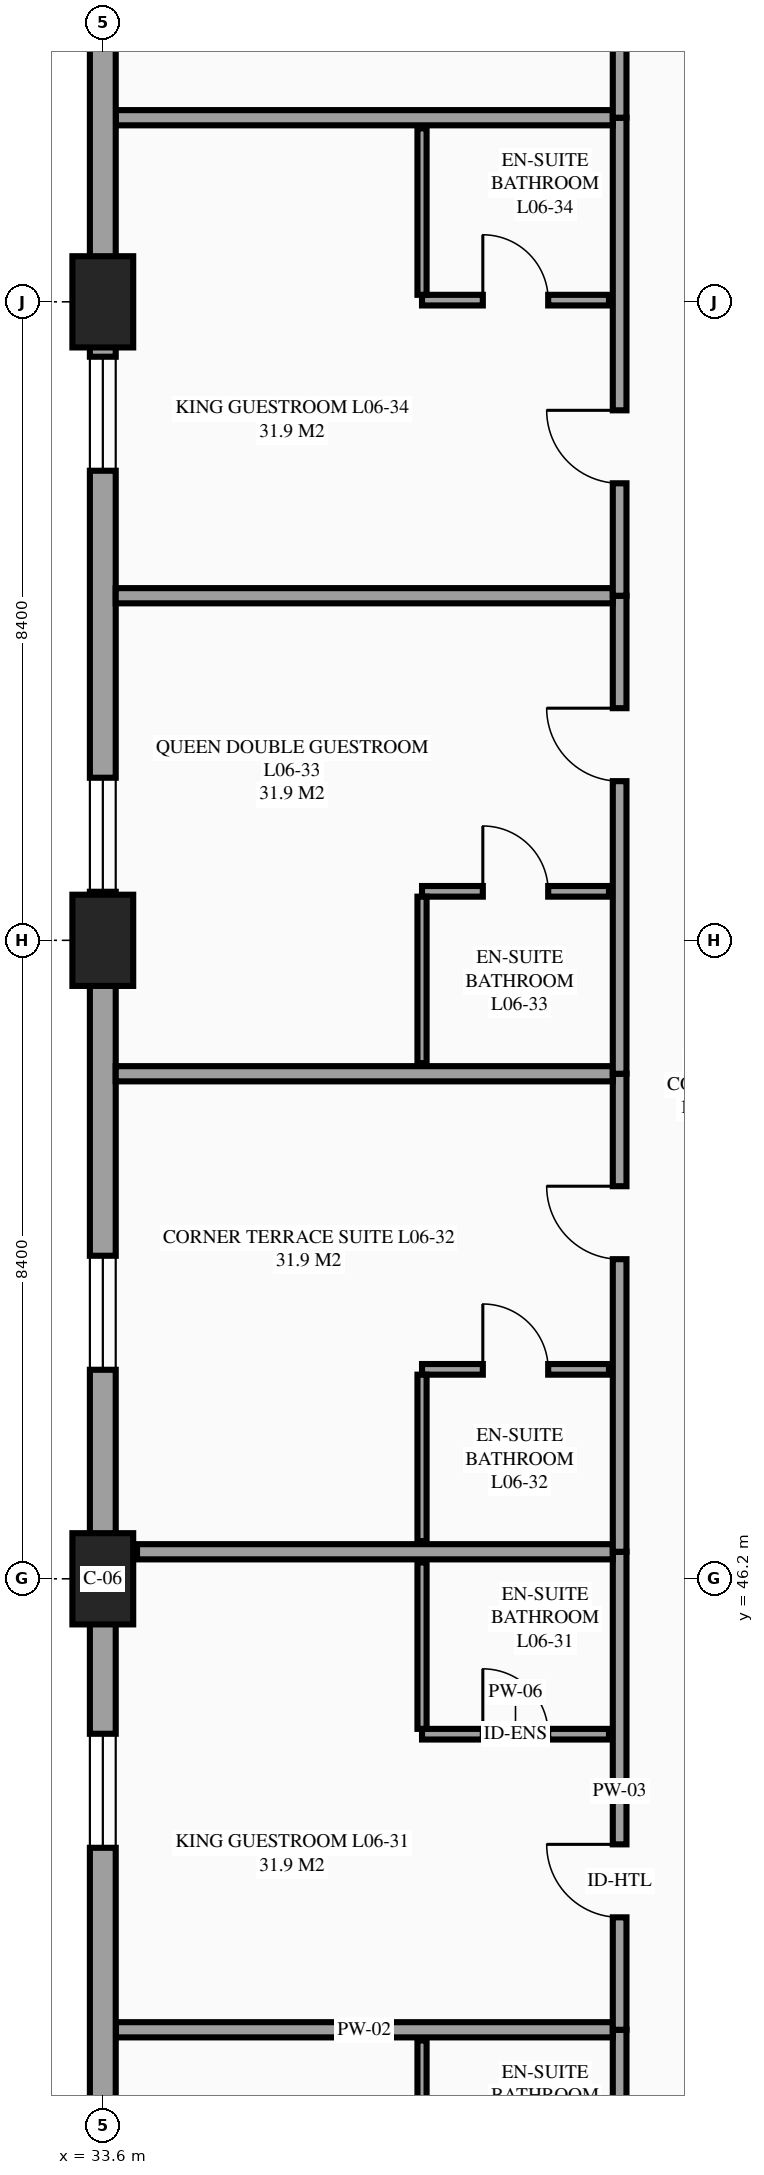
"""IFC4 building model, lengths in metres.
Left out: names, types, materials, properties, quantities, classifications, styles, units other than length and angle.
Written with IfcOpenShell. Run it as: python <this file> out.ifc"""

import sys

from ifc_helpers import new_model, si_unit, direction, frame, frame_2d, origin, origin_2d, place, context, subcontext, project, spatial, rectangle, extrude, element, fill, save


model = new_model("IFC4")
c1 = context("Model", 3, precision=1e-05, world=origin(), true_north=direction((0.0, 1.0)))
c2 = subcontext(c1, "Body", "Model", "MODEL_VIEW")
j1 = project(units=[si_unit("LENGTHUNIT", "METRE"), si_unit("PLANEANGLEUNIT", "RADIAN")], contexts=[c1])
p1 = place(None, origin())
s1 = spatial("IfcSite", under=j1, at=p1, CompositionType="ELEMENT")
p2 = place(p1, origin())
s2 = spatial("IfcBuilding", under=s1, at=p2, CompositionType="ELEMENT")
p3 = place(p2, frame((0.0, 0.0, 25.5)))
s3 = spatial("IfcBuildingStorey", under=s2, at=p3, CompositionType="ELEMENT", Elevation=25.5)
for number, where, z_axis, x_axis in (
    (1, (33.6, 46.2, 0.0), (0.0, 0.0, 1.0), (1.0, 0.0, 0.0)),
    (2, (33.6, 54.6, 0.0), (0.0, 0.0, 1.0), (1.0, 0.0, 0.0)),
    (3, (33.6, 63.0, 0.0), (0.0, 0.0, 1.0), (1.0, 0.0, 0.0)),
):
    element("IfcColumn", number, at=place(p3, frame(where, z_axis=z_axis, x_axis=x_axis)), inside=s3, PredefinedType="COLUMN", context=c2, shape_type="SweptSolid", body=[
        extrude(rectangle(XDim=0.8, YDim=1.2, at=origin_2d()), origin(), (0.0, 0.0, 1.0), 3.6),
    ])
p4 = place(p3, frame((33.6, 63.0, 0.0), z_axis=(0.0, 0.0, 1.0), x_axis=(0.0, -1.0, 0.0)))
e4 = element("IfcWall", 4, at=p4, inside=s3, PredefinedType="STANDARD", context=c2, shape_type="SweptSolid", body=[
    extrude(rectangle(XDim=16.8, YDim=0.34, at=frame_2d((8.4, 0.0))), origin(), (0.0, 0.0, 1.0), 2.63),
])
p5 = place(p4, frame((12.55, 0.0, 0.85)))
e5 = element("IfcOpeningElement", 5, at=p5, cuts=e4, PredefinedType="OPENING", context=c2, shape_type="SweptSolid", body=[
    extrude(rectangle(XDim=1.5, YDim=1.5, at=frame_2d((0.75, 0.75))), frame((0.0, 0.18, 0.0), z_axis=(0.0, -1.0, 0.0), x_axis=(1.0, 0.0, 0.0)), (0.0, 0.0, 1.0), 0.36),
])
p6 = place(p4, frame((6.261, 0.0, 0.85)))
e6 = element("IfcOpeningElement", 6, at=p6, cuts=e4, PredefinedType="OPENING", context=c2, shape_type="SweptSolid", body=[
    extrude(rectangle(XDim=1.5, YDim=1.5, at=frame_2d((0.75, 0.75))), frame((0.0, 0.18, 0.0), z_axis=(0.0, -1.0, 0.0), x_axis=(1.0, 0.0, 0.0)), (0.0, 0.0, 1.0), 0.36),
])
p7 = place(p4, frame((0.722, 0.0, 0.85)))
e7 = element("IfcOpeningElement", 7, at=p7, cuts=e4, PredefinedType="OPENING", context=c2, shape_type="SweptSolid", body=[
    extrude(rectangle(XDim=1.5, YDim=1.5, at=frame_2d((0.75, 0.75))), frame((0.0, 0.18, 0.0), z_axis=(0.0, -1.0, 0.0), x_axis=(1.0, 0.0, 0.0)), (0.0, 0.0, 1.0), 0.36),
])
p8 = place(p3, frame((40.4, 33.978, 0.0), z_axis=(0.0, 0.0, 1.0), x_axis=(0.0, 1.0, 0.0)))
e8 = element("IfcWall", 8, at=p8, inside=s3, PredefinedType="PARTITIONING", context=c2, shape_type="SweptSolid", body=[
    extrude(rectangle(XDim=6.289, YDim=0.18, at=frame_2d((3.145, 0.0))), origin(), (0.0, 0.0, 1.0), 3.375),
])
p9 = place(p8, frame((1.479, 0.0, 0.0)))
e9 = element("IfcOpeningElement", 9, at=p9, cuts=e8, PredefinedType="OPENING", context=c2, shape_type="SweptSolid", body=[
    extrude(rectangle(XDim=0.96, YDim=2.15, at=frame_2d((0.48, 1.075))), frame((0.0, 0.1, 0.0), z_axis=(0.0, -1.0, 0.0), x_axis=(1.0, 0.0, 0.0)), (0.0, 0.0, 1.0), 0.2),
])
p10 = place(p3, frame((33.77, 40.267, 0.0), z_axis=(0.0, 0.0, 1.0), x_axis=(1.0, 0.0, 0.0)))
e10 = element("IfcWall", 10, at=p10, inside=s3, PredefinedType="PARTITIONING", context=c2, shape_type="SweptSolid", body=[
    extrude(rectangle(XDim=6.54, YDim=0.2, at=frame_2d((3.27, 0.0))), origin(), (0.0, 0.0, 1.0), 3.375),
])
p11 = place(p3, frame((37.8, 37.937, 0.0), z_axis=(0.0, 0.0, 1.0), x_axis=(0.0, 1.0, 0.0)))
e11 = element("IfcWall", 11, at=p11, inside=s3, PredefinedType="PARTITIONING", context=c2, shape_type="SweptSolid", body=[
    extrude(rectangle(XDim=2.19, YDim=0.12, at=frame_2d((1.095, 0.0))), origin(), (0.0, 0.0, 1.0), 3.375),
])
p12 = place(p3, frame((40.4, 40.267, 0.0), z_axis=(0.0, 0.0, 1.0), x_axis=(0.0, 1.0, 0.0)))
e12 = element("IfcWall", 12, at=p12, inside=s3, PredefinedType="PARTITIONING", context=c2, shape_type="SweptSolid", body=[
    extrude(rectangle(XDim=6.289, YDim=0.18, at=frame_2d((3.145, 0.0))), origin(), (0.0, 0.0, 1.0), 3.375),
])
p13 = place(p12, frame((1.479, 0.0, 0.0)))
e13 = element("IfcOpeningElement", 13, at=p13, cuts=e12, PredefinedType="OPENING", context=c2, shape_type="SweptSolid", body=[
    extrude(rectangle(XDim=0.96, YDim=2.15, at=frame_2d((0.48, 1.075))), frame((0.0, 0.1, 0.0), z_axis=(0.0, -1.0, 0.0), x_axis=(1.0, 0.0, 0.0)), (0.0, 0.0, 1.0), 0.2),
])
p14 = place(p3, frame((34.05, 46.556, 0.0), z_axis=(0.0, 0.0, 1.0), x_axis=(1.0, 0.0, 0.0)))
e14 = element("IfcWall", 14, at=p14, inside=s3, PredefinedType="PARTITIONING", context=c2, shape_type="SweptSolid", body=[
    extrude(rectangle(XDim=6.26, YDim=0.2, at=frame_2d((3.13, 0.0))), origin(), (0.0, 0.0, 1.0), 3.375),
])
p15 = place(p3, frame((37.8, 44.156, 0.0), z_axis=(0.0, 0.0, 1.0), x_axis=(1.0, 0.0, 0.0)))
e15 = element("IfcWall", 15, at=p15, inside=s3, PredefinedType="PARTITIONING", context=c2, shape_type="SweptSolid", body=[
    extrude(rectangle(XDim=2.46, YDim=0.14, at=frame_2d((1.23, 0.0))), origin(), (0.0, 0.0, 1.0), 3.375),
])
p16 = place(p15, frame((0.8, 0.0, 0.0)))
e16 = element("IfcOpeningElement", 16, at=p16, cuts=e15, PredefinedType="OPENING", context=c2, shape_type="SweptSolid", body=[
    extrude(rectangle(XDim=0.86, YDim=2.1, at=frame_2d((0.43, 1.05))), frame((0.0, 0.08, 0.0), z_axis=(0.0, -1.0, 0.0), x_axis=(1.0, 0.0, 0.0)), (0.0, 0.0, 1.0), 0.16),
])
p17 = place(p3, frame((37.8, 44.226, 0.0), z_axis=(0.0, 0.0, 1.0), x_axis=(0.0, 1.0, 0.0)))
e17 = element("IfcWall", 17, at=p17, inside=s3, PredefinedType="PARTITIONING", context=c2, shape_type="SweptSolid", body=[
    extrude(rectangle(XDim=2.19, YDim=0.12, at=frame_2d((1.095, 0.0))), origin(), (0.0, 0.0, 1.0), 3.375),
])
p18 = place(p3, frame((40.4, 46.556, 0.0), z_axis=(0.0, 0.0, 1.0), x_axis=(0.0, 1.0, 0.0)))
e18 = element("IfcWall", 18, at=p18, inside=s3, PredefinedType="PARTITIONING", context=c2, shape_type="SweptSolid", body=[
    extrude(rectangle(XDim=6.289, YDim=0.18, at=frame_2d((3.145, 0.0))), origin(), (0.0, 0.0, 1.0), 3.375),
])
p19 = place(p18, frame((3.849, 0.0, 0.0)))
e19 = element("IfcOpeningElement", 19, at=p19, cuts=e18, PredefinedType="OPENING", context=c2, shape_type="SweptSolid", body=[
    extrude(rectangle(XDim=0.96, YDim=2.15, at=frame_2d((0.48, 1.075))), frame((0.0, 0.1, 0.0), z_axis=(0.0, -1.0, 0.0), x_axis=(1.0, 0.0, 0.0)), (0.0, 0.0, 1.0), 0.2),
])
p20 = place(p3, frame((33.77, 52.844, 0.0), z_axis=(0.0, 0.0, 1.0), x_axis=(1.0, 0.0, 0.0)))
e20 = element("IfcWall", 20, at=p20, inside=s3, PredefinedType="PARTITIONING", context=c2, shape_type="SweptSolid", body=[
    extrude(rectangle(XDim=6.54, YDim=0.2, at=frame_2d((3.27, 0.0))), origin(), (0.0, 0.0, 1.0), 3.375),
])
p21 = place(p3, frame((37.8, 48.956, 0.0), z_axis=(0.0, 0.0, 1.0), x_axis=(1.0, 0.0, 0.0)))
e21 = element("IfcWall", 21, at=p21, inside=s3, PredefinedType="PARTITIONING", context=c2, shape_type="SweptSolid", body=[
    extrude(rectangle(XDim=2.46, YDim=0.14, at=frame_2d((1.23, 0.0))), origin(), (0.0, 0.0, 1.0), 3.375),
])
p22 = place(p21, frame((0.8, 0.0, 0.0)))
e22 = element("IfcOpeningElement", 22, at=p22, cuts=e21, PredefinedType="OPENING", context=c2, shape_type="SweptSolid", body=[
    extrude(rectangle(XDim=0.86, YDim=2.1, at=frame_2d((0.43, 1.05))), frame((0.0, 0.08, 0.0), z_axis=(0.0, -1.0, 0.0), x_axis=(1.0, 0.0, 0.0)), (0.0, 0.0, 1.0), 0.16),
])
p23 = place(p3, frame((37.8, 46.696, 0.0), z_axis=(0.0, 0.0, 1.0), x_axis=(0.0, 1.0, 0.0)))
e23 = element("IfcWall", 23, at=p23, inside=s3, PredefinedType="PARTITIONING", context=c2, shape_type="SweptSolid", body=[
    extrude(rectangle(XDim=2.19, YDim=0.12, at=frame_2d((1.095, 0.0))), origin(), (0.0, 0.0, 1.0), 3.375),
])
p24 = place(p3, frame((40.4, 52.844, 0.0), z_axis=(0.0, 0.0, 1.0), x_axis=(0.0, 1.0, 0.0)))
e24 = element("IfcWall", 24, at=p24, inside=s3, PredefinedType="PARTITIONING", context=c2, shape_type="SweptSolid", body=[
    extrude(rectangle(XDim=6.289, YDim=0.18, at=frame_2d((3.145, 0.0))), origin(), (0.0, 0.0, 1.0), 3.375),
])
p25 = place(p24, frame((3.85, 0.0, 0.0)))
e25 = element("IfcOpeningElement", 25, at=p25, cuts=e24, PredefinedType="OPENING", context=c2, shape_type="SweptSolid", body=[
    extrude(rectangle(XDim=0.96, YDim=2.15, at=frame_2d((0.48, 1.075))), frame((0.0, 0.1, 0.0), z_axis=(0.0, -1.0, 0.0), x_axis=(1.0, 0.0, 0.0)), (0.0, 0.0, 1.0), 0.2),
])
p26 = place(p3, frame((33.77, 59.133, 0.0), z_axis=(0.0, 0.0, 1.0), x_axis=(1.0, 0.0, 0.0)))
e26 = element("IfcWall", 26, at=p26, inside=s3, PredefinedType="PARTITIONING", context=c2, shape_type="SweptSolid", body=[
    extrude(rectangle(XDim=6.54, YDim=0.2, at=frame_2d((3.27, 0.0))), origin(), (0.0, 0.0, 1.0), 3.375),
])
p27 = place(p3, frame((37.8, 55.244, 0.0), z_axis=(0.0, 0.0, 1.0), x_axis=(1.0, 0.0, 0.0)))
e27 = element("IfcWall", 27, at=p27, inside=s3, PredefinedType="PARTITIONING", context=c2, shape_type="SweptSolid", body=[
    extrude(rectangle(XDim=2.46, YDim=0.14, at=frame_2d((1.23, 0.0))), origin(), (0.0, 0.0, 1.0), 3.375),
])
p28 = place(p27, frame((0.8, 0.0, 0.0)))
e28 = element("IfcOpeningElement", 28, at=p28, cuts=e27, PredefinedType="OPENING", context=c2, shape_type="SweptSolid", body=[
    extrude(rectangle(XDim=0.86, YDim=2.1, at=frame_2d((0.43, 1.05))), frame((0.0, 0.08, 0.0), z_axis=(0.0, -1.0, 0.0), x_axis=(1.0, 0.0, 0.0)), (0.0, 0.0, 1.0), 0.16),
])
p29 = place(p3, frame((37.8, 52.984, 0.0), z_axis=(0.0, 0.0, 1.0), x_axis=(0.0, 1.0, 0.0)))
e29 = element("IfcWall", 29, at=p29, inside=s3, PredefinedType="PARTITIONING", context=c2, shape_type="SweptSolid", body=[
    extrude(rectangle(XDim=2.19, YDim=0.12, at=frame_2d((1.095, 0.0))), origin(), (0.0, 0.0, 1.0), 3.375),
])
p30 = place(p3, frame((40.4, 59.133, 0.0), z_axis=(0.0, 0.0, 1.0), x_axis=(0.0, 1.0, 0.0)))
e30 = element("IfcWall", 30, at=p30, inside=s3, PredefinedType="PARTITIONING", context=c2, shape_type="SweptSolid", body=[
    extrude(rectangle(XDim=6.289, YDim=0.18, at=frame_2d((3.145, 0.0))), origin(), (0.0, 0.0, 1.0), 3.375),
])
p31 = place(p30, frame((1.479, 0.0, 0.0)))
e31 = element("IfcOpeningElement", 31, at=p31, cuts=e30, PredefinedType="OPENING", context=c2, shape_type="SweptSolid", body=[
    extrude(rectangle(XDim=0.96, YDim=2.15, at=frame_2d((0.48, 1.075))), frame((0.0, 0.1, 0.0), z_axis=(0.0, -1.0, 0.0), x_axis=(1.0, 0.0, 0.0)), (0.0, 0.0, 1.0), 0.2),
])
p32 = place(p3, frame((33.77, 65.422, 0.0), z_axis=(0.0, 0.0, 1.0), x_axis=(1.0, 0.0, 0.0)))
e32 = element("IfcWall", 32, at=p32, inside=s3, PredefinedType="PARTITIONING", context=c2, shape_type="SweptSolid", body=[
    extrude(rectangle(XDim=6.54, YDim=0.2, at=frame_2d((3.27, 0.0))), origin(), (0.0, 0.0, 1.0), 3.375),
])
p33 = place(p3, frame((37.8, 63.022, 0.0), z_axis=(0.0, 0.0, 1.0), x_axis=(1.0, 0.0, 0.0)))
e33 = element("IfcWall", 33, at=p33, inside=s3, PredefinedType="PARTITIONING", context=c2, shape_type="SweptSolid", body=[
    extrude(rectangle(XDim=2.46, YDim=0.14, at=frame_2d((1.23, 0.0))), origin(), (0.0, 0.0, 1.0), 2.43),
])
p34 = place(p33, frame((0.8, 0.0, 0.0)))
e34 = element("IfcOpeningElement", 34, at=p34, cuts=e33, PredefinedType="OPENING", context=c2, shape_type="SweptSolid", body=[
    extrude(rectangle(XDim=0.86, YDim=2.1, at=frame_2d((0.43, 1.05))), frame((0.0, 0.08, 0.0), z_axis=(0.0, -1.0, 0.0), x_axis=(1.0, 0.0, 0.0)), (0.0, 0.0, 1.0), 0.16),
])
p35 = place(p3, frame((37.8, 63.092, 0.0), z_axis=(0.0, 0.0, 1.0), x_axis=(0.0, 1.0, 0.0)))
e35 = element("IfcWall", 35, at=p35, inside=s3, PredefinedType="PARTITIONING", context=c2, shape_type="SweptSolid", body=[
    extrude(rectangle(XDim=2.19, YDim=0.12, at=frame_2d((1.095, 0.0))), origin(), (0.0, 0.0, 1.0), 3.375),
])
p36 = place(p3, frame((40.4, 65.422, 0.0), z_axis=(0.0, 0.0, 1.0), x_axis=(0.0, 1.0, 0.0)))
e36 = element("IfcWall", 36, at=p36, inside=s3, PredefinedType="PARTITIONING", context=c2, shape_type="SweptSolid", body=[
    extrude(rectangle(XDim=6.289, YDim=0.18, at=frame_2d((3.145, 0.0))), origin(), (0.0, 0.0, 1.0), 3.375),
])
p37 = place(p36, frame((1.479, 0.0, 0.0)))
e37 = element("IfcOpeningElement", 37, at=p37, cuts=e36, PredefinedType="OPENING", context=c2, shape_type="SweptSolid", body=[
    extrude(rectangle(XDim=0.96, YDim=2.15, at=frame_2d((0.48, 1.075))), frame((0.0, 0.1, 0.0), z_axis=(0.0, -1.0, 0.0), x_axis=(1.0, 0.0, 0.0)), (0.0, 0.0, 1.0), 0.2),
])
p38 = place(p3, frame((33.6, 71.4, 0.0), z_axis=(0.0, 0.0, 1.0), x_axis=(0.0, -1.0, 0.0)))
e38 = element("IfcWall", 38, at=p38, inside=s3, PredefinedType="STANDARD", context=c2, shape_type="SweptSolid", body=[
    extrude(rectangle(XDim=8.4, YDim=0.34, at=frame_2d((4.2, 0.0))), origin(), (0.0, 0.0, 1.0), 2.73),
])
p39 = place(p38, frame((2.083, 0.0, 0.85)))
e39 = element("IfcOpeningElement", 39, at=p39, cuts=e38, PredefinedType="OPENING", context=c2, shape_type="SweptSolid", body=[
    extrude(rectangle(XDim=1.5, YDim=1.5, at=frame_2d((0.75, 0.75))), frame((0.0, 0.18, 0.0), z_axis=(0.0, -1.0, 0.0), x_axis=(1.0, 0.0, 0.0)), (0.0, 0.0, 1.0), 0.36),
])
p40 = place(p3, frame((33.6, 46.2, 0.0), z_axis=(0.0, 0.0, 1.0), x_axis=(0.0, -1.0, 0.0)))
e40 = element("IfcWall", 40, at=p40, inside=s3, PredefinedType="STANDARD", context=c2, shape_type="SweptSolid", body=[
    extrude(rectangle(XDim=8.4, YDim=0.34, at=frame_2d((4.2, 0.0))), origin(), (0.0, 0.0, 1.0), 3.126),
])
p41 = place(p40, frame((2.039, 0.0, 0.85)))
e41 = element("IfcOpeningElement", 41, at=p41, cuts=e40, PredefinedType="OPENING", context=c2, shape_type="SweptSolid", body=[
    extrude(rectangle(XDim=1.5, YDim=1.5, at=frame_2d((0.75, 0.75))), frame((0.0, 0.18, 0.0), z_axis=(0.0, -1.0, 0.0), x_axis=(1.0, 0.0, 0.0)), (0.0, 0.0, 1.0), 0.36),
])
p42 = place(p41, origin())
e42 = element("IfcWindow", 42, at=p42, inside=s3, PartitioningType="SINGLE_PANEL", PredefinedType="WINDOW", context=c2, shape_type="SweptSolid", body=[
    extrude(rectangle(XDim=1.5, YDim=1.5, at=frame_2d((0.75, 0.75))), frame((0.0, 0.03, 0.0), z_axis=(0.0, -1.0, 0.0), x_axis=(1.0, 0.0, 0.0)), (0.0, 0.0, 1.0), 0.06),
])
fill(e41, e42)
p43 = place(p5, origin())
e43 = element("IfcWindow", 43, at=p43, inside=s3, PartitioningType="SINGLE_PANEL", PredefinedType="WINDOW", context=c2, shape_type="SweptSolid", body=[
    extrude(rectangle(XDim=1.5, YDim=1.5, at=frame_2d((0.75, 0.75))), frame((0.0, 0.03, 0.0), z_axis=(0.0, -1.0, 0.0), x_axis=(1.0, 0.0, 0.0)), (0.0, 0.0, 1.0), 0.06),
])
fill(e5, e43)
p44 = place(p6, origin())
e44 = element("IfcWindow", 44, at=p44, inside=s3, PartitioningType="SINGLE_PANEL", PredefinedType="WINDOW", context=c2, shape_type="SweptSolid", body=[
    extrude(rectangle(XDim=1.5, YDim=1.5, at=frame_2d((0.75, 0.75))), frame((0.0, 0.03, 0.0), z_axis=(0.0, -1.0, 0.0), x_axis=(1.0, 0.0, 0.0)), (0.0, 0.0, 1.0), 0.06),
])
fill(e6, e44)
p45 = place(p7, origin())
e45 = element("IfcWindow", 45, at=p45, inside=s3, PartitioningType="SINGLE_PANEL", PredefinedType="WINDOW", context=c2, shape_type="SweptSolid", body=[
    extrude(rectangle(XDim=1.5, YDim=1.5, at=frame_2d((0.75, 0.75))), frame((0.0, 0.03, 0.0), z_axis=(0.0, -1.0, 0.0), x_axis=(1.0, 0.0, 0.0)), (0.0, 0.0, 1.0), 0.06),
])
fill(e7, e45)
p46 = place(p13, origin())
e46 = element("IfcDoor", 46, at=p46, inside=s3, OperationType="SINGLE_SWING_RIGHT", PredefinedType="DOOR", context=c2, shape_type="SweptSolid", body=[
    extrude(rectangle(XDim=0.96, YDim=2.15, at=frame_2d((0.48, 1.075))), frame((0.0, 0.025, 0.0), z_axis=(0.0, -1.0, 0.0), x_axis=(1.0, 0.0, 0.0)), (0.0, 0.0, 1.0), 0.05),
])
fill(e13, e46)
p47 = place(p16, origin())
e47 = element("IfcDoor", 47, at=p47, inside=s3, OperationType="SINGLE_SWING_LEFT", PredefinedType="DOOR", context=c2, shape_type="SweptSolid", body=[
    extrude(rectangle(XDim=0.86, YDim=2.1, at=frame_2d((0.43, 1.05))), frame((0.0, 0.025, 0.0), z_axis=(0.0, -1.0, 0.0), x_axis=(1.0, 0.0, 0.0)), (0.0, 0.0, 1.0), 0.05),
])
fill(e16, e47)
p48 = place(p19, origin())
e48 = element("IfcDoor", 48, at=p48, inside=s3, OperationType="SINGLE_SWING_RIGHT", PredefinedType="DOOR", context=c2, shape_type="SweptSolid", body=[
    extrude(rectangle(XDim=0.96, YDim=2.15, at=frame_2d((0.48, 1.075))), frame((0.0, 0.025, 0.0), z_axis=(0.0, -1.0, 0.0), x_axis=(1.0, 0.0, 0.0)), (0.0, 0.0, 1.0), 0.05),
])
fill(e19, e48)
p49 = place(p22, origin())
e49 = element("IfcDoor", 49, at=p49, inside=s3, OperationType="SINGLE_SWING_LEFT", PredefinedType="DOOR", context=c2, shape_type="SweptSolid", body=[
    extrude(rectangle(XDim=0.86, YDim=2.1, at=frame_2d((0.43, 1.05))), frame((0.0, 0.025, 0.0), z_axis=(0.0, -1.0, 0.0), x_axis=(1.0, 0.0, 0.0)), (0.0, 0.0, 1.0), 0.05),
])
fill(e22, e49)
p50 = place(p25, origin())
e50 = element("IfcDoor", 50, at=p50, inside=s3, OperationType="SINGLE_SWING_RIGHT", PredefinedType="DOOR", context=c2, shape_type="SweptSolid", body=[
    extrude(rectangle(XDim=0.96, YDim=2.15, at=frame_2d((0.48, 1.075))), frame((0.0, 0.025, 0.0), z_axis=(0.0, -1.0, 0.0), x_axis=(1.0, 0.0, 0.0)), (0.0, 0.0, 1.0), 0.05),
])
fill(e25, e50)
p51 = place(p28, origin())
e51 = element("IfcDoor", 51, at=p51, inside=s3, OperationType="SINGLE_SWING_LEFT", PredefinedType="DOOR", context=c2, shape_type="SweptSolid", body=[
    extrude(rectangle(XDim=0.86, YDim=2.1, at=frame_2d((0.43, 1.05))), frame((0.0, 0.025, 0.0), z_axis=(0.0, -1.0, 0.0), x_axis=(1.0, 0.0, 0.0)), (0.0, 0.0, 1.0), 0.05),
])
fill(e28, e51)
p52 = place(p31, origin())
e52 = element("IfcDoor", 52, at=p52, inside=s3, OperationType="SINGLE_SWING_RIGHT", PredefinedType="DOOR", context=c2, shape_type="SweptSolid", body=[
    extrude(rectangle(XDim=0.96, YDim=2.15, at=frame_2d((0.48, 1.075))), frame((0.0, 0.025, 0.0), z_axis=(0.0, -1.0, 0.0), x_axis=(1.0, 0.0, 0.0)), (0.0, 0.0, 1.0), 0.05),
])
fill(e31, e52)
p53 = place(p34, origin())
e53 = element("IfcDoor", 53, at=p53, inside=s3, OperationType="SINGLE_SWING_LEFT", PredefinedType="DOOR", context=c2, shape_type="SweptSolid", body=[
    extrude(rectangle(XDim=0.86, YDim=2.1, at=frame_2d((0.43, 1.05))), frame((0.0, 0.025, 0.0), z_axis=(0.0, -1.0, 0.0), x_axis=(1.0, 0.0, 0.0)), (0.0, 0.0, 1.0), 0.05),
])
fill(e34, e53)
save(model, sys.argv[1])
